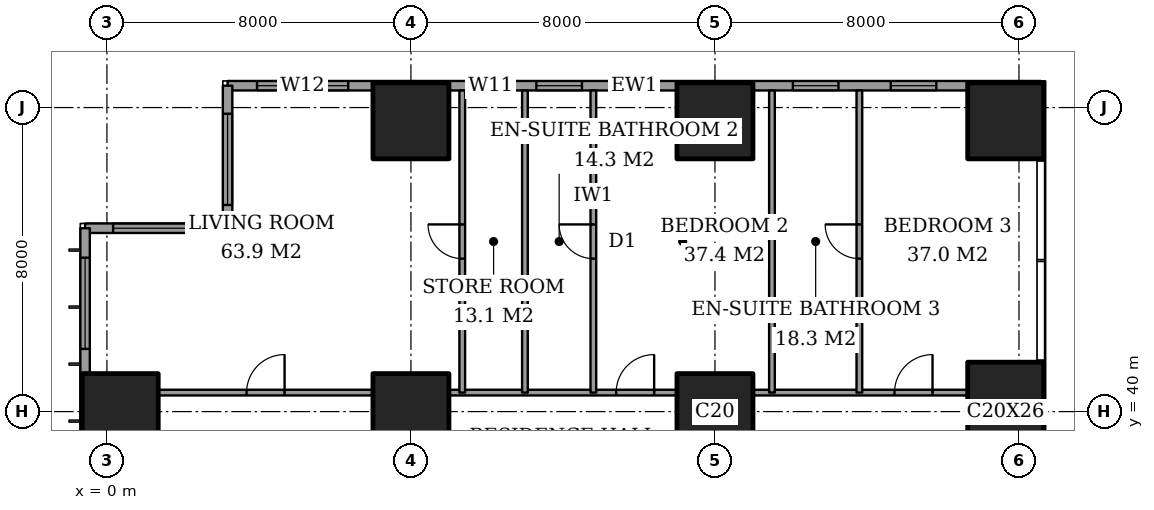
"""IFC4 building model, lengths in metres.
Left out: names, types, materials, properties, quantities, classifications, styles, units other than length and angle.
Written with IfcOpenShell. Run it as: python <this file> out.ifc"""

import sys

from ifc_helpers import new_model, si_unit, direction, frame, frame_2d, origin, origin_2d, place, context, subcontext, project, spatial, rectangle, extrude, element, fill, save


model = new_model("IFC4")
c1 = context("Model", 3, precision=1e-05, world=origin(), true_north=direction((0.0, 1.0)))
c2 = subcontext(c1, "Body", "Model", "MODEL_VIEW")
j1 = project(units=[si_unit("LENGTHUNIT", "METRE"), si_unit("PLANEANGLEUNIT", "RADIAN")], contexts=[c1])
p1 = place(None, origin())
s1 = spatial("IfcSite", under=j1, at=p1, CompositionType="ELEMENT")
p2 = place(p1, origin())
s2 = spatial("IfcBuilding", under=s1, at=p2, CompositionType="ELEMENT")
p3 = place(p2, frame((0.0, 0.0, 168.2)))
s3 = spatial("IfcBuildingStorey", under=s2, at=p3, CompositionType="ELEMENT", Elevation=168.2)
for number, where, z_axis, x_axis in (
    (1, (0.35, 40.0, 0.0), (0.0, 0.0, 1.0), (1.0, 0.0, 0.0)),
    (2, (8.0, 40.0, 0.0), (0.0, 0.0, 1.0), (1.0, 0.0, 0.0)),
    (3, (8.0, 47.65, 0.0), (0.0, 0.0, 1.0), (1.0, 0.0, 0.0)),
    (4, (16.0, 40.0, 0.0), (0.0, 0.0, 1.0), (1.0, 0.0, 0.0)),
    (5, (16.0, 47.65, 0.0), (0.0, 0.0, 1.0), (1.0, 0.0, 0.0)),
):
    element("IfcColumn", number, at=place(p3, frame(where, z_axis=z_axis, x_axis=x_axis)), inside=s3, PredefinedType="COLUMN", context=c2, shape_type="SweptSolid", body=[
        extrude(rectangle(XDim=2.0, YDim=2.0, at=origin_2d()), origin(), (0.0, 0.0, 1.0), 3.6),
    ])
p4 = place(p3, frame((23.65, 40.0, 0.0), z_axis=(0.0, 0.0, 1.0), x_axis=(1.0, 0.0, 0.0)))
e6 = element("IfcColumn", 6, at=p4, inside=s3, PredefinedType="COLUMN", context=c2, shape_type="SweptSolid", body=[
    extrude(rectangle(XDim=2.0, YDim=2.6, at=origin_2d()), origin(), (0.0, 0.0, 1.0), 3.6),
])
p5 = place(p3, frame((23.65, 47.65, 0.0), z_axis=(0.0, 0.0, 1.0), x_axis=(1.0, 0.0, 0.0)))
e7 = element("IfcColumn", 7, at=p5, inside=s3, PredefinedType="COLUMN", context=c2, shape_type="SweptSolid", body=[
    extrude(rectangle(XDim=2.0, YDim=2.0, at=origin_2d()), origin(), (0.0, 0.0, 1.0), 3.6),
])
p6 = place(p3, frame((24.575, 48.575, 0.0), z_axis=(0.0, 0.0, 1.0), x_axis=(-1.0, 0.0, 0.0)))
e8 = element("IfcWall", 8, at=p6, inside=s3, PredefinedType="SOLIDWALL", context=c2, shape_type="SweptSolid", body=[
    extrude(rectangle(XDim=21.4, YDim=0.25, at=frame_2d((10.7, 0.0))), origin(), (0.0, 0.0, 1.0), 3.6),
])
p7 = place(p6, frame((2.75, 0.0, 0.4)))
e9 = element("IfcOpeningElement", 9, at=p7, cuts=e8, PredefinedType="OPENING", context=c2, shape_type="SweptSolid", body=[
    extrude(rectangle(XDim=1.2, YDim=2.2, at=frame_2d((0.6, 1.1))), frame((0.0, 0.135, 0.0), z_axis=(0.0, -1.0, 0.0), x_axis=(1.0, 0.0, 0.0)), (0.0, 0.0, 1.0), 0.27),
])
p8 = place(p6, frame((5.325, 0.0, 0.4)))
e10 = element("IfcOpeningElement", 10, at=p8, cuts=e8, PredefinedType="OPENING", context=c2, shape_type="SweptSolid", body=[
    extrude(rectangle(XDim=1.2, YDim=2.2, at=frame_2d((0.6, 1.1))), frame((0.0, 0.135, 0.0), z_axis=(0.0, -1.0, 0.0), x_axis=(1.0, 0.0, 0.0)), (0.0, 0.0, 1.0), 0.27),
])
p9 = place(p6, frame((10.075, 0.0, 0.4)))
e11 = element("IfcOpeningElement", 11, at=p9, cuts=e8, PredefinedType="OPENING", context=c2, shape_type="SweptSolid", body=[
    extrude(rectangle(XDim=1.2, YDim=2.2, at=frame_2d((0.6, 1.1))), frame((0.0, 0.135, 0.0), z_axis=(0.0, -1.0, 0.0), x_axis=(1.0, 0.0, 0.0)), (0.0, 0.0, 1.0), 0.27),
])
p10 = place(p6, frame((12.075, 0.0, 0.4)))
e12 = element("IfcOpeningElement", 12, at=p10, cuts=e8, PredefinedType="OPENING", context=c2, shape_type="SweptSolid", body=[
    extrude(rectangle(XDim=1.2, YDim=2.2, at=frame_2d((0.6, 1.1))), frame((0.0, 0.135, 0.0), z_axis=(0.0, -1.0, 0.0), x_axis=(1.0, 0.0, 0.0)), (0.0, 0.0, 1.0), 0.27),
])
p11 = place(p6, frame((13.875, 0.0, 0.4)))
e13 = element("IfcOpeningElement", 13, at=p11, cuts=e8, PredefinedType="OPENING", context=c2, shape_type="SweptSolid", body=[
    extrude(rectangle(XDim=1.2, YDim=2.2, at=frame_2d((0.6, 1.1))), frame((0.0, 0.135, 0.0), z_axis=(0.0, -1.0, 0.0), x_axis=(1.0, 0.0, 0.0)), (0.0, 0.0, 1.0), 0.27),
])
p12 = place(p6, frame((18.225, 0.0, 0.4)))
e14 = element("IfcOpeningElement", 14, at=p12, cuts=e8, PredefinedType="OPENING", context=c2, shape_type="SweptSolid", body=[
    extrude(rectangle(XDim=2.4, YDim=2.2, at=frame_2d((1.2, 1.1))), frame((0.0, 0.135, 0.0), z_axis=(0.0, -1.0, 0.0), x_axis=(1.0, 0.0, 0.0)), (0.0, 0.0, 1.0), 0.27),
])
p13 = place(p3, frame((3.175, 48.575, 0.0), z_axis=(0.0, 0.0, 1.0), x_axis=(0.0, -1.0, 0.0)))
e15 = element("IfcWall", 15, at=p13, inside=s3, PredefinedType="SOLIDWALL", context=c2, shape_type="SweptSolid", body=[
    extrude(rectangle(XDim=3.75, YDim=0.25, at=frame_2d((1.875, 0.0))), origin(), (0.0, 0.0, 1.0), 3.6),
])
p14 = place(p13, frame((0.738, 0.0, 0.4)))
e16 = element("IfcOpeningElement", 16, at=p14, cuts=e15, PredefinedType="OPENING", context=c2, shape_type="SweptSolid", body=[
    extrude(rectangle(XDim=2.4, YDim=2.2, at=frame_2d((1.2, 1.1))), frame((0.0, 0.135, 0.0), z_axis=(0.0, -1.0, 0.0), x_axis=(1.0, 0.0, 0.0)), (0.0, 0.0, 1.0), 0.27),
])
p15 = place(p3, frame((3.175, 44.825, 0.0), z_axis=(0.0, 0.0, 1.0), x_axis=(-1.0, 0.0, 0.0)))
e17 = element("IfcWall", 17, at=p15, inside=s3, PredefinedType="SOLIDWALL", context=c2, shape_type="SweptSolid", body=[
    extrude(rectangle(XDim=3.75, YDim=0.25, at=frame_2d((1.875, 0.0))), origin(), (0.0, 0.0, 1.0), 3.6),
])
p16 = place(p15, frame((0.613, 0.0, 0.4)))
e18 = element("IfcOpeningElement", 18, at=p16, cuts=e17, PredefinedType="OPENING", context=c2, shape_type="SweptSolid", body=[
    extrude(rectangle(XDim=2.4, YDim=2.2, at=frame_2d((1.2, 1.1))), frame((0.0, 0.135, 0.0), z_axis=(0.0, -1.0, 0.0), x_axis=(1.0, 0.0, 0.0)), (0.0, 0.0, 1.0), 0.27),
])
p17 = place(p3, frame((-0.575, 44.825, 0.0), z_axis=(0.0, 0.0, 1.0), x_axis=(0.0, -1.0, 0.0)))
e19 = element("IfcWall", 19, at=p17, inside=s3, PredefinedType="SOLIDWALL", context=c2, shape_type="SweptSolid", body=[
    extrude(rectangle(XDim=41.65, YDim=0.25, at=frame_2d((20.825, 0.0))), origin(), (0.0, 0.0, 1.0), 3.6),
])
p18 = place(p17, frame((0.775, 0.0, 0.4)))
e20 = element("IfcOpeningElement", 20, at=p18, cuts=e19, PredefinedType="OPENING", context=c2, shape_type="SweptSolid", body=[
    extrude(rectangle(XDim=2.4, YDim=2.2, at=frame_2d((1.2, 1.1))), frame((0.0, 0.135, 0.0), z_axis=(0.0, -1.0, 0.0), x_axis=(1.0, 0.0, 0.0)), (0.0, 0.0, 1.0), 0.27),
])
p19 = place(p17, frame((6.1, 0.0, 0.4)))
e21 = element("IfcOpeningElement", 21, at=p19, cuts=e19, PredefinedType="OPENING", context=c2, shape_type="SweptSolid", body=[
    extrude(rectangle(XDim=1.2, YDim=2.2, at=frame_2d((0.6, 1.1))), frame((0.0, 0.135, 0.0), z_axis=(0.0, -1.0, 0.0), x_axis=(1.0, 0.0, 0.0)), (0.0, 0.0, 1.0), 0.27),
])
p20 = place(p17, frame((8.425, 0.0, 0.4)))
e22 = element("IfcOpeningElement", 22, at=p20, cuts=e19, PredefinedType="OPENING", context=c2, shape_type="SweptSolid", body=[
    extrude(rectangle(XDim=2.4, YDim=2.2, at=frame_2d((1.2, 1.1))), frame((0.0, 0.135, 0.0), z_axis=(0.0, -1.0, 0.0), x_axis=(1.0, 0.0, 0.0)), (0.0, 0.0, 1.0), 0.27),
])
p21 = place(p17, frame((15.625, 0.0, 0.4)))
e23 = element("IfcOpeningElement", 23, at=p21, cuts=e19, PredefinedType="OPENING", context=c2, shape_type="SweptSolid", body=[
    extrude(rectangle(XDim=2.4, YDim=2.2, at=frame_2d((1.2, 1.1))), frame((0.0, 0.135, 0.0), z_axis=(0.0, -1.0, 0.0), x_axis=(1.0, 0.0, 0.0)), (0.0, 0.0, 1.0), 0.27),
])
p22 = place(p17, frame((23.625, 0.0, 0.4)))
e24 = element("IfcOpeningElement", 24, at=p22, cuts=e19, PredefinedType="OPENING", context=c2, shape_type="SweptSolid", body=[
    extrude(rectangle(XDim=2.4, YDim=2.2, at=frame_2d((1.2, 1.1))), frame((0.0, 0.135, 0.0), z_axis=(0.0, -1.0, 0.0), x_axis=(1.0, 0.0, 0.0)), (0.0, 0.0, 1.0), 0.27),
])
p23 = place(p17, frame((30.825, 0.0, 0.4)))
e25 = element("IfcOpeningElement", 25, at=p23, cuts=e19, PredefinedType="OPENING", context=c2, shape_type="SweptSolid", body=[
    extrude(rectangle(XDim=2.4, YDim=2.2, at=frame_2d((1.2, 1.1))), frame((0.0, 0.135, 0.0), z_axis=(0.0, -1.0, 0.0), x_axis=(1.0, 0.0, 0.0)), (0.0, 0.0, 1.0), 0.27),
])
p24 = place(p17, frame((34.5, 0.0, 0.4)))
e26 = element("IfcOpeningElement", 26, at=p24, cuts=e19, PredefinedType="OPENING", context=c2, shape_type="SweptSolid", body=[
    extrude(rectangle(XDim=1.2, YDim=2.2, at=frame_2d((0.6, 1.1))), frame((0.0, 0.135, 0.0), z_axis=(0.0, -1.0, 0.0), x_axis=(1.0, 0.0, 0.0)), (0.0, 0.0, 1.0), 0.27),
])
p25 = place(p17, frame((38.475, 0.0, 0.4)))
e27 = element("IfcOpeningElement", 27, at=p25, cuts=e19, PredefinedType="OPENING", context=c2, shape_type="SweptSolid", body=[
    extrude(rectangle(XDim=2.4, YDim=2.2, at=frame_2d((1.2, 1.1))), frame((0.0, 0.135, 0.0), z_axis=(0.0, -1.0, 0.0), x_axis=(1.0, 0.0, 0.0)), (0.0, 0.0, 1.0), 0.27),
])
p26 = place(p3, frame((1.35, 40.5, 0.0), z_axis=(0.0, 0.0, 1.0), x_axis=(1.0, 0.0, 0.0)))
e28 = element("IfcWall", 28, at=p26, inside=s3, PredefinedType="PARTITIONING", context=c2, shape_type="SweptSolid", body=[
    extrude(rectangle(XDim=5.65, YDim=0.15, at=frame_2d((2.825, 0.0))), origin(), (0.0, 0.0, 1.0), 3.25),
])
p27 = place(p26, frame((2.325, 0.0, 0.0)))
e29 = element("IfcOpeningElement", 29, at=p27, cuts=e28, PredefinedType="OPENING", context=c2, shape_type="SweptSolid", body=[
    extrude(rectangle(XDim=1.0, YDim=2.1, at=frame_2d((0.5, 1.05))), frame((0.0, 0.085, 0.0), z_axis=(0.0, -1.0, 0.0), x_axis=(1.0, 0.0, 0.0)), (0.0, 0.0, 1.0), 0.17),
])
p28 = place(p3, frame((9.0, 40.5, 0.0), z_axis=(0.0, 0.0, 1.0), x_axis=(1.0, 0.0, 0.0)))
e30 = element("IfcWall", 30, at=p28, inside=s3, PredefinedType="PARTITIONING", context=c2, shape_type="SweptSolid", body=[
    extrude(rectangle(XDim=6.0, YDim=0.15, at=frame_2d((3.0, 0.0))), origin(), (0.0, 0.0, 1.0), 3.25),
])
p29 = place(p28, frame((4.4, 0.0, 0.0)))
e31 = element("IfcOpeningElement", 31, at=p29, cuts=e30, PredefinedType="OPENING", context=c2, shape_type="SweptSolid", body=[
    extrude(rectangle(XDim=1.0, YDim=2.1, at=frame_2d((0.5, 1.05))), frame((0.0, 0.085, 0.0), z_axis=(0.0, -1.0, 0.0), x_axis=(1.0, 0.0, 0.0)), (0.0, 0.0, 1.0), 0.17),
])
p30 = place(p3, frame((17.0, 40.5, 0.0), z_axis=(0.0, 0.0, 1.0), x_axis=(1.0, 0.0, 0.0)))
e32 = element("IfcWall", 32, at=p30, inside=s3, PredefinedType="PARTITIONING", context=c2, shape_type="SweptSolid", body=[
    extrude(rectangle(XDim=5.65, YDim=0.15, at=frame_2d((2.825, 0.0))), origin(), (0.0, 0.0, 1.0), 3.25),
])
p31 = place(p30, frame((3.725, 0.0, 0.0)))
e33 = element("IfcOpeningElement", 33, at=p31, cuts=e32, PredefinedType="OPENING", context=c2, shape_type="SweptSolid", body=[
    extrude(rectangle(XDim=1.0, YDim=2.1, at=frame_2d((0.5, 1.05))), frame((0.0, 0.085, 0.0), z_axis=(0.0, -1.0, 0.0), x_axis=(1.0, 0.0, 0.0)), (0.0, 0.0, 1.0), 0.17),
])
p32 = place(p3, frame((9.35, 40.5, 0.0), z_axis=(0.0, 0.0, 1.0), x_axis=(0.0, 1.0, 0.0)))
e34 = element("IfcWall", 34, at=p32, inside=s3, PredefinedType="PARTITIONING", context=c2, shape_type="SweptSolid", body=[
    extrude(rectangle(XDim=7.95, YDim=0.15, at=frame_2d((3.975, 0.0))), origin(), (0.0, 0.0, 1.0), 3.25),
])
p33 = place(p32, frame((3.525, 0.0, 0.0)))
e35 = element("IfcOpeningElement", 35, at=p33, cuts=e34, PredefinedType="OPENING", context=c2, shape_type="SweptSolid", body=[
    extrude(rectangle(XDim=0.9, YDim=2.1, at=frame_2d((0.45, 1.05))), frame((0.0, 0.085, 0.0), z_axis=(0.0, -1.0, 0.0), x_axis=(1.0, 0.0, 0.0)), (0.0, 0.0, 1.0), 0.17),
])
p34 = place(p3, frame((11.0, 40.5, 0.0), z_axis=(0.0, 0.0, 1.0), x_axis=(0.0, 1.0, 0.0)))
e36 = element("IfcWall", 36, at=p34, inside=s3, PredefinedType="PARTITIONING", context=c2, shape_type="SweptSolid", body=[
    extrude(rectangle(XDim=7.95, YDim=0.15, at=frame_2d((3.975, 0.0))), origin(), (0.0, 0.0, 1.0), 3.25),
])
p35 = place(p3, frame((12.8, 40.5, 0.0), z_axis=(0.0, 0.0, 1.0), x_axis=(0.0, 1.0, 0.0)))
e37 = element("IfcWall", 37, at=p35, inside=s3, PredefinedType="PARTITIONING", context=c2, shape_type="SweptSolid", body=[
    extrude(rectangle(XDim=7.95, YDim=0.15, at=frame_2d((3.975, 0.0))), origin(), (0.0, 0.0, 1.0), 3.25),
])
p36 = place(p35, frame((3.525, 0.0, 0.0)))
e38 = element("IfcOpeningElement", 38, at=p36, cuts=e37, PredefinedType="OPENING", context=c2, shape_type="SweptSolid", body=[
    extrude(rectangle(XDim=0.9, YDim=2.1, at=frame_2d((0.45, 1.05))), frame((0.0, 0.085, 0.0), z_axis=(0.0, -1.0, 0.0), x_axis=(1.0, 0.0, 0.0)), (0.0, 0.0, 1.0), 0.17),
])
p37 = place(p3, frame((17.5, 40.5, 0.0), z_axis=(0.0, 0.0, 1.0), x_axis=(0.0, 1.0, 0.0)))
e39 = element("IfcWall", 39, at=p37, inside=s3, PredefinedType="PARTITIONING", context=c2, shape_type="SweptSolid", body=[
    extrude(rectangle(XDim=7.95, YDim=0.15, at=frame_2d((3.975, 0.0))), origin(), (0.0, 0.0, 1.0), 3.25),
])
p38 = place(p3, frame((19.8, 40.5, 0.0), z_axis=(0.0, 0.0, 1.0), x_axis=(0.0, 1.0, 0.0)))
e40 = element("IfcWall", 40, at=p38, inside=s3, PredefinedType="PARTITIONING", context=c2, shape_type="SweptSolid", body=[
    extrude(rectangle(XDim=7.95, YDim=0.15, at=frame_2d((3.975, 0.0))), origin(), (0.0, 0.0, 1.0), 3.25),
])
p39 = place(p38, frame((3.525, 0.0, 0.0)))
e41 = element("IfcOpeningElement", 41, at=p39, cuts=e40, PredefinedType="OPENING", context=c2, shape_type="SweptSolid", body=[
    extrude(rectangle(XDim=0.9, YDim=2.1, at=frame_2d((0.45, 1.05))), frame((0.0, 0.085, 0.0), z_axis=(0.0, -1.0, 0.0), x_axis=(1.0, 0.0, 0.0)), (0.0, 0.0, 1.0), 0.17),
])
p40 = place(p7, origin())
e42 = element("IfcWindow", 42, at=p40, inside=s3, PartitioningType="SINGLE_PANEL", PredefinedType="WINDOW", context=c2, shape_type="SweptSolid", body=[
    extrude(rectangle(XDim=1.2, YDim=2.2, at=frame_2d((0.6, 1.1))), frame((0.0, 0.03, 0.0), z_axis=(0.0, -1.0, 0.0), x_axis=(1.0, 0.0, 0.0)), (0.0, 0.0, 1.0), 0.06),
])
fill(e9, e42)
p41 = place(p8, origin())
e43 = element("IfcWindow", 43, at=p41, inside=s3, PartitioningType="SINGLE_PANEL", PredefinedType="WINDOW", context=c2, shape_type="SweptSolid", body=[
    extrude(rectangle(XDim=1.2, YDim=2.2, at=frame_2d((0.6, 1.1))), frame((0.0, 0.03, 0.0), z_axis=(0.0, -1.0, 0.0), x_axis=(1.0, 0.0, 0.0)), (0.0, 0.0, 1.0), 0.06),
])
fill(e10, e43)
p42 = place(p9, origin())
e44 = element("IfcWindow", 44, at=p42, inside=s3, PartitioningType="SINGLE_PANEL", PredefinedType="WINDOW", context=c2, shape_type="SweptSolid", body=[
    extrude(rectangle(XDim=1.2, YDim=2.2, at=frame_2d((0.6, 1.1))), frame((0.0, 0.03, 0.0), z_axis=(0.0, -1.0, 0.0), x_axis=(1.0, 0.0, 0.0)), (0.0, 0.0, 1.0), 0.06),
])
fill(e11, e44)
p43 = place(p10, origin())
e45 = element("IfcWindow", 45, at=p43, inside=s3, PartitioningType="SINGLE_PANEL", PredefinedType="WINDOW", context=c2, shape_type="SweptSolid", body=[
    extrude(rectangle(XDim=1.2, YDim=2.2, at=frame_2d((0.6, 1.1))), frame((0.0, 0.03, 0.0), z_axis=(0.0, -1.0, 0.0), x_axis=(1.0, 0.0, 0.0)), (0.0, 0.0, 1.0), 0.06),
])
fill(e12, e45)
p44 = place(p11, origin())
e46 = element("IfcWindow", 46, at=p44, inside=s3, PartitioningType="SINGLE_PANEL", PredefinedType="WINDOW", context=c2, shape_type="SweptSolid", body=[
    extrude(rectangle(XDim=1.2, YDim=2.2, at=frame_2d((0.6, 1.1))), frame((0.0, 0.03, 0.0), z_axis=(0.0, -1.0, 0.0), x_axis=(1.0, 0.0, 0.0)), (0.0, 0.0, 1.0), 0.06),
])
fill(e13, e46)
p45 = place(p12, origin())
e47 = element("IfcWindow", 47, at=p45, inside=s3, PartitioningType="SINGLE_PANEL", PredefinedType="WINDOW", context=c2, shape_type="SweptSolid", body=[
    extrude(rectangle(XDim=2.4, YDim=2.2, at=frame_2d((1.2, 1.1))), frame((0.0, 0.03, 0.0), z_axis=(0.0, -1.0, 0.0), x_axis=(1.0, 0.0, 0.0)), (0.0, 0.0, 1.0), 0.06),
])
fill(e14, e47)
p46 = place(p14, origin())
e48 = element("IfcWindow", 48, at=p46, inside=s3, PartitioningType="SINGLE_PANEL", PredefinedType="WINDOW", context=c2, shape_type="SweptSolid", body=[
    extrude(rectangle(XDim=2.4, YDim=2.2, at=frame_2d((1.2, 1.1))), frame((0.0, 0.03, 0.0), z_axis=(0.0, -1.0, 0.0), x_axis=(1.0, 0.0, 0.0)), (0.0, 0.0, 1.0), 0.06),
])
fill(e16, e48)
p47 = place(p16, origin())
e49 = element("IfcWindow", 49, at=p47, inside=s3, PartitioningType="SINGLE_PANEL", PredefinedType="WINDOW", context=c2, shape_type="SweptSolid", body=[
    extrude(rectangle(XDim=2.4, YDim=2.2, at=frame_2d((1.2, 1.1))), frame((0.0, 0.03, 0.0), z_axis=(0.0, -1.0, 0.0), x_axis=(1.0, 0.0, 0.0)), (0.0, 0.0, 1.0), 0.06),
])
fill(e18, e49)
p48 = place(p18, origin())
e50 = element("IfcWindow", 50, at=p48, inside=s3, PartitioningType="SINGLE_PANEL", PredefinedType="WINDOW", context=c2, shape_type="SweptSolid", body=[
    extrude(rectangle(XDim=2.4, YDim=2.2, at=frame_2d((1.2, 1.1))), frame((0.0, 0.03, 0.0), z_axis=(0.0, -1.0, 0.0), x_axis=(1.0, 0.0, 0.0)), (0.0, 0.0, 1.0), 0.06),
])
fill(e20, e50)
p49 = place(p27, origin())
e51 = element("IfcDoor", 51, at=p49, inside=s3, OperationType="SINGLE_SWING_LEFT", PredefinedType="DOOR", context=c2, shape_type="SweptSolid", body=[
    extrude(rectangle(XDim=1.0, YDim=2.1, at=frame_2d((0.5, 1.05))), frame((0.0, 0.025, 0.0), z_axis=(0.0, -1.0, 0.0), x_axis=(1.0, 0.0, 0.0)), (0.0, 0.0, 1.0), 0.05),
])
fill(e29, e51)
p50 = place(p33, origin())
e52 = element("IfcDoor", 52, at=p50, inside=s3, OperationType="SINGLE_SWING_LEFT", PredefinedType="DOOR", context=c2, shape_type="SweptSolid", body=[
    extrude(rectangle(XDim=0.9, YDim=2.1, at=frame_2d((0.45, 1.05))), frame((0.0, 0.025, 0.0), z_axis=(0.0, -1.0, 0.0), x_axis=(1.0, 0.0, 0.0)), (0.0, 0.0, 1.0), 0.05),
])
fill(e35, e52)
p51 = place(p36, origin())
e53 = element("IfcDoor", 53, at=p51, inside=s3, OperationType="SINGLE_SWING_LEFT", PredefinedType="DOOR", context=c2, shape_type="SweptSolid", body=[
    extrude(rectangle(XDim=0.9, YDim=2.1, at=frame_2d((0.45, 1.05))), frame((0.0, 0.025, 0.0), z_axis=(0.0, -1.0, 0.0), x_axis=(1.0, 0.0, 0.0)), (0.0, 0.0, 1.0), 0.05),
])
fill(e38, e53)
p52 = place(p29, origin())
e54 = element("IfcDoor", 54, at=p52, inside=s3, OperationType="SINGLE_SWING_LEFT", PredefinedType="DOOR", context=c2, shape_type="SweptSolid", body=[
    extrude(rectangle(XDim=1.0, YDim=2.1, at=frame_2d((0.5, 1.05))), frame((0.0, 0.025, 0.0), z_axis=(0.0, -1.0, 0.0), x_axis=(1.0, 0.0, 0.0)), (0.0, 0.0, 1.0), 0.05),
])
fill(e31, e54)
p53 = place(p39, origin())
e55 = element("IfcDoor", 55, at=p53, inside=s3, OperationType="SINGLE_SWING_LEFT", PredefinedType="DOOR", context=c2, shape_type="SweptSolid", body=[
    extrude(rectangle(XDim=0.9, YDim=2.1, at=frame_2d((0.45, 1.05))), frame((0.0, 0.025, 0.0), z_axis=(0.0, -1.0, 0.0), x_axis=(1.0, 0.0, 0.0)), (0.0, 0.0, 1.0), 0.05),
])
fill(e41, e55)
p54 = place(p31, origin())
e56 = element("IfcDoor", 56, at=p54, inside=s3, OperationType="SINGLE_SWING_LEFT", PredefinedType="DOOR", context=c2, shape_type="SweptSolid", body=[
    extrude(rectangle(XDim=1.0, YDim=2.1, at=frame_2d((0.5, 1.05))), frame((0.0, 0.025, 0.0), z_axis=(0.0, -1.0, 0.0), x_axis=(1.0, 0.0, 0.0)), (0.0, 0.0, 1.0), 0.05),
])
fill(e33, e56)
save(model, sys.argv[1])
